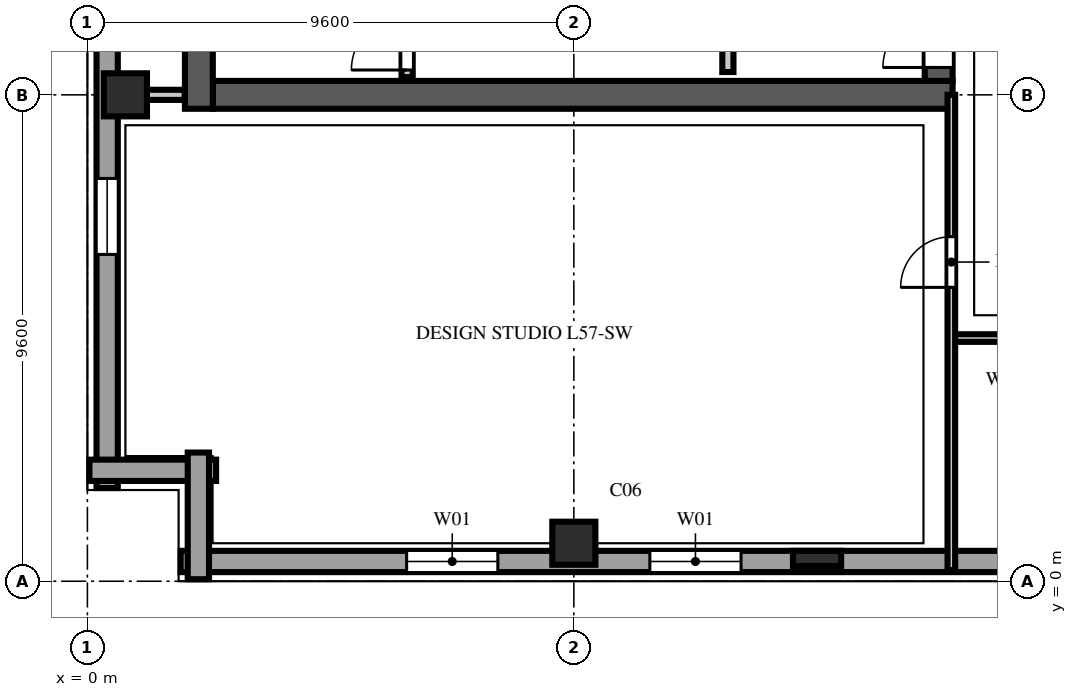
"""IFC4 building model, lengths in metres.
Left out: names, types, materials, properties, quantities, classifications, styles, units other than length and angle.
Written with IfcOpenShell. Run it as: python <this file> out.ifc"""

import sys

from ifc_helpers import new_model, si_unit, direction, frame, frame_2d, origin, origin_2d, place, context, subcontext, project, spatial, rectangle, extrude, element, fill, save


model = new_model("IFC4")
c1 = context("Model", 3, precision=1e-05, world=origin(), true_north=direction((0.0, 1.0)))
c2 = subcontext(c1, "Body", "Model", "MODEL_VIEW")
j1 = project(units=[si_unit("LENGTHUNIT", "METRE"), si_unit("PLANEANGLEUNIT", "RADIAN")], contexts=[c1])
p1 = place(None, origin())
s1 = spatial("IfcSite", under=j1, at=p1, CompositionType="ELEMENT")
p2 = place(p1, origin())
s2 = spatial("IfcBuilding", under=s1, at=p2, CompositionType="ELEMENT")
p3 = place(p2, frame((0.0, 0.0, 225.6)))
s3 = spatial("IfcBuildingStorey", under=s2, at=p3, CompositionType="ELEMENT", Elevation=225.6)
p4 = place(p3, frame((2.475, 9.6, 0.0), z_axis=(0.0, 0.0, 1.0), x_axis=(1.0, 0.0, 0.0)))
e1 = element("IfcWall", 1, at=p4, inside=s3, PredefinedType="SHEAR", context=c2, shape_type="SweptSolid", body=[
    extrude(rectangle(XDim=14.6, YDim=0.55, at=frame_2d((7.3, 0.0))), origin(), (0.0, 0.0, 1.0), 3.54),
])
p5 = place(p3, frame((2.2, 9.325, 0.0), z_axis=(0.0, 0.0, 1.0), x_axis=(0.0, 1.0, 0.0)))
e2 = element("IfcWall", 2, at=p5, inside=s3, PredefinedType="SHEAR", context=c2, shape_type="SweptSolid", body=[
    extrude(rectangle(XDim=38.95, YDim=0.55, at=frame_2d((19.475, 0.0))), origin(), (0.0, 0.0, 1.0), 3.54),
])
p6 = place(p3, frame((16.8, 9.875, 0.0), z_axis=(0.0, 0.0, 1.0), x_axis=(0.0, 1.0, 0.0)))
e3 = element("IfcWall", 3, at=p6, inside=s3, PredefinedType="SHEAR", context=c2, shape_type="SweptSolid", body=[
    extrude(rectangle(XDim=12.525, YDim=0.55, at=frame_2d((6.262, 0.0))), origin(), (0.0, 0.0, 1.0), 3.54),
])
p7 = place(p6, frame((0.265, 0.0, 0.0)))
e4 = element("IfcOpeningElement", 4, at=p7, cuts=e3, PredefinedType="OPENING", context=c2, shape_type="SweptSolid", body=[
    extrude(rectangle(XDim=1.1, YDim=2.2, at=frame_2d((0.55, 1.1))), frame((0.0, 0.287, 0.0), z_axis=(0.0, -1.0, 0.0), x_axis=(1.0, 0.0, 0.0)), (0.0, 0.0, 1.0), 0.574),
])
for number, where, z_axis, x_axis in (
    (5, (0.75, 9.6, 0.0), (0.0, 0.0, 1.0), (1.0, 0.0, 0.0)),
    (6, (9.6, 0.75, 0.0), (0.0, 0.0, 1.0), (1.0, 0.0, 0.0)),
):
    element("IfcColumn", number, at=place(p3, frame(where, z_axis=z_axis, x_axis=x_axis)), inside=s3, PredefinedType="COLUMN", context=c2, shape_type="SweptSolid", body=[
        extrude(rectangle(XDim=0.85, YDim=0.85, at=origin_2d()), origin(), (0.0, 0.0, 1.0), 3.8),
    ])
p8 = place(p3, frame((14.4, 0.45, 0.0), z_axis=(0.0, 0.0, 1.0), x_axis=(1.0, 0.0, 0.0)))
e7 = element("IfcColumn", 7, at=p8, inside=s3, PredefinedType="PILASTER", context=c2, shape_type="SweptSolid", body=[
    extrude(rectangle(XDim=0.95, YDim=0.3, at=origin_2d()), origin(), (0.0, 0.0, 1.0), 3.8),
])
p9 = place(p3, frame((1.84, 0.39, 0.0), z_axis=(0.0, 0.0, 1.0), x_axis=(1.0, 0.0, 0.0)))
e8 = element("IfcWall", 8, at=p9, inside=s3, PredefinedType="SOLIDWALL", context=c2, shape_type="SweptSolid", body=[
    extrude(rectangle(XDim=53.92, YDim=0.42, at=frame_2d((26.96, 0.0))), origin(), (0.0, 0.0, 1.0), 3.54),
])
p10 = place(p9, frame((4.46, 0.0, 0.85)))
e9 = element("IfcOpeningElement", 9, at=p10, cuts=e8, PredefinedType="OPENING", context=c2, shape_type="SweptSolid", body=[
    extrude(rectangle(XDim=1.8, YDim=1.85, at=frame_2d((0.9, 0.925))), frame((0.0, 0.222, 0.0), z_axis=(0.0, -1.0, 0.0), x_axis=(1.0, 0.0, 0.0)), (0.0, 0.0, 1.0), 0.444),
])
p11 = place(p9, frame((9.26, 0.0, 0.85)))
e10 = element("IfcOpeningElement", 10, at=p11, cuts=e8, PredefinedType="OPENING", context=c2, shape_type="SweptSolid", body=[
    extrude(rectangle(XDim=1.8, YDim=1.85, at=frame_2d((0.9, 0.925))), frame((0.0, 0.222, 0.0), z_axis=(0.0, -1.0, 0.0), x_axis=(1.0, 0.0, 0.0)), (0.0, 0.0, 1.0), 0.444),
])
p12 = place(p9, frame((18.86, 0.0, 0.85)))
e11 = element("IfcOpeningElement", 11, at=p12, cuts=e8, PredefinedType="OPENING", context=c2, shape_type="SweptSolid", body=[
    extrude(rectangle(XDim=1.8, YDim=1.85, at=frame_2d((0.9, 0.925))), frame((0.0, 0.222, 0.0), z_axis=(0.0, -1.0, 0.0), x_axis=(1.0, 0.0, 0.0)), (0.0, 0.0, 1.0), 0.444),
])
p13 = place(p9, frame((28.46, 0.0, 0.85)))
e12 = element("IfcOpeningElement", 12, at=p13, cuts=e8, PredefinedType="OPENING", context=c2, shape_type="SweptSolid", body=[
    extrude(rectangle(XDim=1.8, YDim=1.85, at=frame_2d((0.9, 0.925))), frame((0.0, 0.222, 0.0), z_axis=(0.0, -1.0, 0.0), x_axis=(1.0, 0.0, 0.0)), (0.0, 0.0, 1.0), 0.444),
])
p14 = place(p9, frame((33.26, 0.0, 0.85)))
e13 = element("IfcOpeningElement", 13, at=p14, cuts=e8, PredefinedType="OPENING", context=c2, shape_type="SweptSolid", body=[
    extrude(rectangle(XDim=1.8, YDim=1.85, at=frame_2d((0.9, 0.925))), frame((0.0, 0.222, 0.0), z_axis=(0.0, -1.0, 0.0), x_axis=(1.0, 0.0, 0.0)), (0.0, 0.0, 1.0), 0.444),
])
p15 = place(p9, frame((38.06, 0.0, 0.85)))
e14 = element("IfcOpeningElement", 14, at=p15, cuts=e8, PredefinedType="OPENING", context=c2, shape_type="SweptSolid", body=[
    extrude(rectangle(XDim=1.8, YDim=1.85, at=frame_2d((0.9, 0.925))), frame((0.0, 0.222, 0.0), z_axis=(0.0, -1.0, 0.0), x_axis=(1.0, 0.0, 0.0)), (0.0, 0.0, 1.0), 0.444),
])
p16 = place(p9, frame((42.86, 0.0, 0.85)))
e15 = element("IfcOpeningElement", 15, at=p16, cuts=e8, PredefinedType="OPENING", context=c2, shape_type="SweptSolid", body=[
    extrude(rectangle(XDim=1.8, YDim=1.85, at=frame_2d((0.9, 0.925))), frame((0.0, 0.222, 0.0), z_axis=(0.0, -1.0, 0.0), x_axis=(1.0, 0.0, 0.0)), (0.0, 0.0, 1.0), 0.444),
])
p17 = place(p9, frame((47.66, 0.0, 0.85)))
e16 = element("IfcOpeningElement", 16, at=p17, cuts=e8, PredefinedType="OPENING", context=c2, shape_type="SweptSolid", body=[
    extrude(rectangle(XDim=1.8, YDim=1.85, at=frame_2d((0.9, 0.925))), frame((0.0, 0.222, 0.0), z_axis=(0.0, -1.0, 0.0), x_axis=(1.0, 0.0, 0.0)), (0.0, 0.0, 1.0), 0.444),
])
p18 = place(p3, frame((0.39, 55.76, 0.0), z_axis=(0.0, 0.0, 1.0), x_axis=(0.0, -1.0, 0.0)))
e17 = element("IfcWall", 17, at=p18, inside=s3, PredefinedType="SOLIDWALL", context=c2, shape_type="SweptSolid", body=[
    extrude(rectangle(XDim=53.92, YDim=0.42, at=frame_2d((26.96, 0.0))), origin(), (0.0, 0.0, 1.0), 3.54),
])
p19 = place(p18, frame((4.885, 0.0, 0.9)))
e18 = element("IfcOpeningElement", 18, at=p19, cuts=e17, PredefinedType="OPENING", context=c2, shape_type="SweptSolid", body=[
    extrude(rectangle(XDim=0.95, YDim=1.85, at=frame_2d((0.475, 0.925))), frame((0.0, 0.222, 0.0), z_axis=(0.0, -1.0, 0.0), x_axis=(1.0, 0.0, 0.0)), (0.0, 0.0, 1.0), 0.444),
])
p20 = place(p18, frame((9.41, 0.0, 0.9)))
e19 = element("IfcOpeningElement", 19, at=p20, cuts=e17, PredefinedType="OPENING", context=c2, shape_type="SweptSolid", body=[
    extrude(rectangle(XDim=1.5, YDim=1.85, at=frame_2d((0.75, 0.925))), frame((0.0, 0.222, 0.0), z_axis=(0.0, -1.0, 0.0), x_axis=(1.0, 0.0, 0.0)), (0.0, 0.0, 1.0), 0.444),
])
p21 = place(p18, frame((14.485, 0.0, 0.9)))
e20 = element("IfcOpeningElement", 20, at=p21, cuts=e17, PredefinedType="OPENING", context=c2, shape_type="SweptSolid", body=[
    extrude(rectangle(XDim=0.95, YDim=1.85, at=frame_2d((0.475, 0.925))), frame((0.0, 0.222, 0.0), z_axis=(0.0, -1.0, 0.0), x_axis=(1.0, 0.0, 0.0)), (0.0, 0.0, 1.0), 0.444),
])
p22 = place(p18, frame((19.01, 0.0, 0.9)))
e21 = element("IfcOpeningElement", 21, at=p22, cuts=e17, PredefinedType="OPENING", context=c2, shape_type="SweptSolid", body=[
    extrude(rectangle(XDim=1.5, YDim=1.85, at=frame_2d((0.75, 0.925))), frame((0.0, 0.222, 0.0), z_axis=(0.0, -1.0, 0.0), x_axis=(1.0, 0.0, 0.0)), (0.0, 0.0, 1.0), 0.444),
])
p23 = place(p18, frame((24.085, 0.0, 0.9)))
e22 = element("IfcOpeningElement", 22, at=p23, cuts=e17, PredefinedType="OPENING", context=c2, shape_type="SweptSolid", body=[
    extrude(rectangle(XDim=0.95, YDim=1.85, at=frame_2d((0.475, 0.925))), frame((0.0, 0.222, 0.0), z_axis=(0.0, -1.0, 0.0), x_axis=(1.0, 0.0, 0.0)), (0.0, 0.0, 1.0), 0.444),
])
p24 = place(p18, frame((28.61, 0.0, 0.9)))
e23 = element("IfcOpeningElement", 23, at=p24, cuts=e17, PredefinedType="OPENING", context=c2, shape_type="SweptSolid", body=[
    extrude(rectangle(XDim=1.5, YDim=1.85, at=frame_2d((0.75, 0.925))), frame((0.0, 0.222, 0.0), z_axis=(0.0, -1.0, 0.0), x_axis=(1.0, 0.0, 0.0)), (0.0, 0.0, 1.0), 0.444),
])
p25 = place(p18, frame((33.685, 0.0, 0.9)))
e24 = element("IfcOpeningElement", 24, at=p25, cuts=e17, PredefinedType="OPENING", context=c2, shape_type="SweptSolid", body=[
    extrude(rectangle(XDim=0.95, YDim=1.85, at=frame_2d((0.475, 0.925))), frame((0.0, 0.222, 0.0), z_axis=(0.0, -1.0, 0.0), x_axis=(1.0, 0.0, 0.0)), (0.0, 0.0, 1.0), 0.444),
])
p26 = place(p18, frame((38.21, 0.0, 0.9)))
e25 = element("IfcOpeningElement", 25, at=p26, cuts=e17, PredefinedType="OPENING", context=c2, shape_type="SweptSolid", body=[
    extrude(rectangle(XDim=1.5, YDim=1.85, at=frame_2d((0.75, 0.925))), frame((0.0, 0.222, 0.0), z_axis=(0.0, -1.0, 0.0), x_axis=(1.0, 0.0, 0.0)), (0.0, 0.0, 1.0), 0.444),
])
p27 = place(p18, frame((43.285, 0.0, 0.9)))
e26 = element("IfcOpeningElement", 26, at=p27, cuts=e17, PredefinedType="OPENING", context=c2, shape_type="SweptSolid", body=[
    extrude(rectangle(XDim=0.95, YDim=1.85, at=frame_2d((0.475, 0.925))), frame((0.0, 0.222, 0.0), z_axis=(0.0, -1.0, 0.0), x_axis=(1.0, 0.0, 0.0)), (0.0, 0.0, 1.0), 0.444),
])
p28 = place(p18, frame((47.81, 0.0, 0.9)))
e27 = element("IfcOpeningElement", 27, at=p28, cuts=e17, PredefinedType="OPENING", context=c2, shape_type="SweptSolid", body=[
    extrude(rectangle(XDim=1.5, YDim=1.85, at=frame_2d((0.75, 0.925))), frame((0.0, 0.222, 0.0), z_axis=(0.0, -1.0, 0.0), x_axis=(1.0, 0.0, 0.0)), (0.0, 0.0, 1.0), 0.444),
])
for number, where, z_axis, x_axis in (
    (28, (0.04, 2.19, 0.0), (0.0, 0.0, 1.0), (1.0, 0.0, 0.0)),
    (29, (2.19, 2.54, 0.0), (0.0, 0.0, 1.0), (0.0, -1.0, 0.0)),
):
    element("IfcWall", number, at=place(p3, frame(where, z_axis=z_axis, x_axis=x_axis)), inside=s3, PredefinedType="SOLIDWALL", context=c2, shape_type="SweptSolid", body=[
        extrude(rectangle(XDim=2.5, YDim=0.42, at=frame_2d((1.25, 0.0))), origin(), (0.0, 0.0, 1.0), 3.54),
    ])
p29 = place(p3, frame((6.31, 9.95, 0.0), z_axis=(0.0, 0.0, 1.0), x_axis=(0.0, 1.0, 0.0)))
e30 = element("IfcWall", 30, at=p29, inside=s3, PredefinedType="SOLIDWALL", context=c2, shape_type="SweptSolid", body=[
    extrude(rectangle(XDim=7.81, YDim=0.22, at=frame_2d((3.905, 0.0))), origin(), (0.0, 0.0, 1.0), 3.54),
])
p30 = place(p29, frame((0.14, 0.0, 0.0)))
e31 = element("IfcOpeningElement", 31, at=p30, cuts=e30, PredefinedType="OPENING", context=c2, shape_type="SweptSolid", body=[
    extrude(rectangle(XDim=1.1, YDim=2.2, at=frame_2d((0.55, 1.1))), frame((0.0, 0.122, 0.0), z_axis=(0.0, -1.0, 0.0), x_axis=(1.0, 0.0, 0.0)), (0.0, 0.0, 1.0), 0.244),
])
p31 = place(p3, frame((12.64, 10.05, 0.0), z_axis=(0.0, 0.0, 1.0), x_axis=(0.0, 1.0, 0.0)))
e32 = element("IfcWall", 32, at=p31, inside=s3, PredefinedType="SOLIDWALL", context=c2, shape_type="SweptSolid", body=[
    extrude(rectangle(XDim=7.71, YDim=0.22, at=frame_2d((3.855, 0.0))), origin(), (0.0, 0.0, 1.0), 3.54),
])
p32 = place(p3, frame((0.85, 9.6, 0.0), z_axis=(0.0, 0.0, 1.0), x_axis=(1.0, 0.0, 0.0)))
e33 = element("IfcWall", 33, at=p32, inside=s3, PredefinedType="SOLIDWALL", context=c2, shape_type="SweptSolid", body=[
    extrude(rectangle(XDim=1.07, YDim=0.2, at=frame_2d((0.535, 0.0))), origin(), (0.0, 0.0, 1.0), 2.923),
])
p33 = place(p3, frame((17.05, 4.8, 0.0), z_axis=(0.0, 0.0, 1.0), x_axis=(1.0, 0.0, 0.0)))
e34 = element("IfcWall", 34, at=p33, inside=s3, PredefinedType="PARTITIONING", context=c2, shape_type="SweptSolid", body=[
    extrude(rectangle(XDim=2.15, YDim=0.15, at=frame_2d((1.075, 0.0))), origin(), (0.0, 0.0, 1.0), 3.54),
])
p34 = place(p3, frame((17.05, 0.22, 0.0), z_axis=(0.0, 0.0, 1.0), x_axis=(0.0, 1.0, 0.0)))
e35 = element("IfcWall", 35, at=p34, inside=s3, PredefinedType="PARTITIONING", context=c2, shape_type="SweptSolid", body=[
    extrude(rectangle(XDim=9.38, YDim=0.15, at=frame_2d((4.69, 0.0))), origin(), (0.0, 0.0, 1.0), 3.54),
])
p35 = place(p34, frame((5.58, 0.0, 0.0)))
e36 = element("IfcOpeningElement", 36, at=p35, cuts=e35, PredefinedType="OPENING", context=c2, shape_type="SweptSolid", body=[
    extrude(rectangle(XDim=1.0, YDim=2.2, at=frame_2d((0.5, 1.1))), frame((0.0, 0.087, 0.0), z_axis=(0.0, -1.0, 0.0), x_axis=(1.0, 0.0, 0.0)), (0.0, 0.0, 1.0), 0.174),
])
p36 = place(p10, origin())
e37 = element("IfcWindow", 37, at=p36, inside=s3, PartitioningType="DOUBLE_PANEL_VERTICAL", PredefinedType="WINDOW", context=c2, shape_type="SweptSolid", body=[
    extrude(rectangle(XDim=1.8, YDim=1.85, at=frame_2d((0.9, 0.925))), frame((0.0, 0.11, 0.0), z_axis=(0.0, -1.0, 0.0), x_axis=(1.0, 0.0, 0.0)), (0.0, 0.0, 1.0), 0.06),
])
fill(e9, e37)
p37 = place(p11, origin())
e38 = element("IfcWindow", 38, at=p37, inside=s3, PartitioningType="DOUBLE_PANEL_VERTICAL", PredefinedType="WINDOW", context=c2, shape_type="SweptSolid", body=[
    extrude(rectangle(XDim=1.8, YDim=1.85, at=frame_2d((0.9, 0.925))), frame((0.0, 0.11, 0.0), z_axis=(0.0, -1.0, 0.0), x_axis=(1.0, 0.0, 0.0)), (0.0, 0.0, 1.0), 0.06),
])
fill(e10, e38)
p38 = place(p28, origin())
e39 = element("IfcWindow", 39, at=p38, inside=s3, PartitioningType="DOUBLE_PANEL_VERTICAL", PredefinedType="WINDOW", context=c2, shape_type="SweptSolid", body=[
    extrude(rectangle(XDim=1.5, YDim=1.85, at=frame_2d((0.75, 0.925))), frame((0.0, 0.11, 0.0), z_axis=(0.0, -1.0, 0.0), x_axis=(1.0, 0.0, 0.0)), (0.0, 0.0, 1.0), 0.06),
])
fill(e27, e39)
p39 = place(p30, origin())
e40 = element("IfcDoor", 40, at=p39, inside=s3, OperationType="SINGLE_SWING_LEFT", PredefinedType="DOOR", context=c2, shape_type="SweptSolid", body=[
    extrude(rectangle(XDim=1.1, YDim=2.2, at=frame_2d((0.55, 1.1))), frame((0.0, 0.025, 0.0), z_axis=(0.0, -1.0, 0.0), x_axis=(1.0, 0.0, 0.0)), (0.0, 0.0, 1.0), 0.05),
])
fill(e31, e40)
p40 = place(p7, origin())
e41 = element("IfcDoor", 41, at=p40, inside=s3, OperationType="SINGLE_SWING_LEFT", PredefinedType="DOOR", context=c2, shape_type="SweptSolid", body=[
    extrude(rectangle(XDim=1.1, YDim=2.2, at=frame_2d((0.55, 1.1))), frame((0.0, 0.025, 0.0), z_axis=(0.0, -1.0, 0.0), x_axis=(1.0, 0.0, 0.0)), (0.0, 0.0, 1.0), 0.05),
])
fill(e4, e41)
p41 = place(p35, origin())
e42 = element("IfcDoor", 42, at=p41, inside=s3, OperationType="SINGLE_SWING_LEFT", PredefinedType="DOOR", context=c2, shape_type="SweptSolid", body=[
    extrude(rectangle(XDim=1.0, YDim=2.2, at=frame_2d((0.5, 1.1))), frame((0.0, 0.025, 0.0), z_axis=(0.0, -1.0, 0.0), x_axis=(1.0, 0.0, 0.0)), (0.0, 0.0, 1.0), 0.05),
])
fill(e36, e42)
save(model, sys.argv[1])
